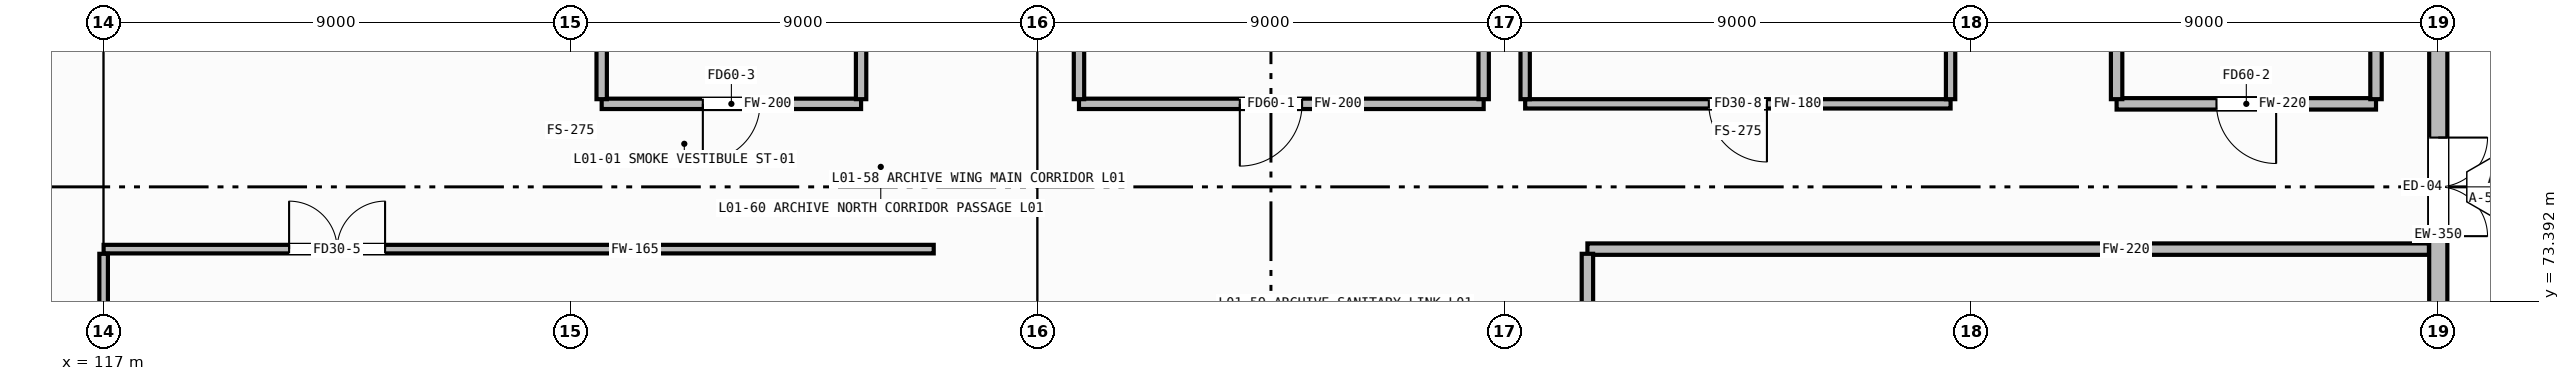
"""IFC4 building model, lengths in metres.
Left out: names, types, materials, properties, quantities, classifications, styles, units other than length and angle.
Written with IfcOpenShell. Run it as: python <this file> out.ifc"""

import sys

from ifc_helpers import new_model, si_unit, direction, frame, frame_2d, origin, place, context, subcontext, project, spatial, rectangle, extrude, element, fill, save


model = new_model("IFC4")
c1 = context("Model", 3, precision=1e-05, world=origin(), true_north=direction((0.0, 1.0)))
c2 = subcontext(c1, "Body", "Model", "MODEL_VIEW")
j1 = project(units=[si_unit("LENGTHUNIT", "METRE"), si_unit("PLANEANGLEUNIT", "RADIAN")], contexts=[c1])
p1 = place(None, origin())
s1 = spatial("IfcSite", under=j1, at=p1, CompositionType="ELEMENT")
p2 = place(p1, origin())
s2 = spatial("IfcBuilding", under=s1, at=p2, CompositionType="ELEMENT")
p3 = place(p2, origin())
s3 = spatial("IfcBuildingStorey", under=s2, at=p3, CompositionType="ELEMENT", Elevation=0.0)
p4 = place(p3, frame((162.0, 78.85, 0.0), z_axis=(0.0, 0.0, 1.0), x_axis=(0.0, -1.0, 0.0)))
e1 = element("IfcWall", 1, at=p4, inside=s3, PredefinedType="STANDARD", context=c2, shape_type="SweptSolid", body=[
    extrude(rectangle(XDim=6.5, YDim=0.35, at=frame_2d((3.25, 0.0))), origin(), (0.0, 0.0, 1.0), 4.055),
])
p5 = place(p4, frame((2.3, 0.0, 0.0)))
e2 = element("IfcOpeningElement", 2, at=p5, cuts=e1, PredefinedType="OPENING", context=c2, shape_type="SweptSolid", body=[
    extrude(rectangle(XDim=1.9, YDim=2.4, at=frame_2d((0.95, 1.2))), frame((0.0, 0.187, 0.0), z_axis=(0.0, -1.0, 0.0), x_axis=(1.0, 0.0, 0.0)), (0.0, 0.0, 1.0), 0.374),
])
p6 = place(p3, frame((126.6, 77.2, 0.0), z_axis=(0.0, 0.0, 1.0), x_axis=(1.0, 0.0, 0.0)))
e3 = element("IfcWall", 3, at=p6, inside=s3, PredefinedType="PARTITIONING", context=c2, shape_type="SweptSolid", body=[
    extrude(rectangle(XDim=5.0, YDim=0.2, at=frame_2d((2.5, 0.0))), origin(), (0.0, 0.0, 1.0), 4.555),
])
p7 = place(p6, frame((1.95, 0.0, 0.0)))
e4 = element("IfcOpeningElement", 4, at=p7, cuts=e3, PredefinedType="OPENING", context=c2, shape_type="SweptSolid", body=[
    extrude(rectangle(XDim=1.1, YDim=2.08, at=frame_2d((0.55, 1.04))), frame((0.0, 0.112, 0.0), z_axis=(0.0, -1.0, 0.0), x_axis=(1.0, 0.0, 0.0)), (0.0, 0.0, 1.0), 0.224),
])
for number, where, z_axis, x_axis in (
    (5, (126.6, 77.29, 0.0), (0.0, 0.0, 1.0), (0.0, 1.0, 0.0)),
    (6, (131.6, 77.29, 0.0), (0.0, 0.0, 1.0), (0.0, 1.0, 0.0)),
):
    element("IfcWall", number, at=place(p3, frame(where, z_axis=z_axis, x_axis=x_axis)), inside=s3, PredefinedType="PARTITIONING", context=c2, shape_type="SweptSolid", body=[
        extrude(rectangle(XDim=3.82, YDim=0.2, at=frame_2d((1.91, 0.0))), origin(), (0.0, 0.0, 1.0), 4.555),
    ])
p8 = place(p3, frame((155.8, 77.2, 0.0), z_axis=(0.0, 0.0, 1.0), x_axis=(1.0, 0.0, 0.0)))
e7 = element("IfcWall", 7, at=p8, inside=s3, PredefinedType="PARTITIONING", context=c2, shape_type="SweptSolid", body=[
    extrude(rectangle(XDim=5.0, YDim=0.22, at=frame_2d((2.5, 0.0))), origin(), (0.0, 0.0, 1.0), 4.555),
])
p9 = place(p8, frame((1.925, 0.0, 0.0)))
e8 = element("IfcOpeningElement", 8, at=p9, cuts=e7, PredefinedType="OPENING", context=c2, shape_type="SweptSolid", body=[
    extrude(rectangle(XDim=1.15, YDim=2.1, at=frame_2d((0.575, 1.05))), frame((0.0, 0.122, 0.0), z_axis=(0.0, -1.0, 0.0), x_axis=(1.0, 0.0, 0.0)), (0.0, 0.0, 1.0), 0.244),
])
for number, where, z_axis, x_axis in (
    (9, (155.8, 77.29, 0.0), (0.0, 0.0, 1.0), (0.0, 1.0, 0.0)),
    (10, (160.8, 77.29, 0.0), (0.0, 0.0, 1.0), (0.0, 1.0, 0.0)),
):
    element("IfcWall", number, at=place(p3, frame(where, z_axis=z_axis, x_axis=x_axis)), inside=s3, PredefinedType="PARTITIONING", context=c2, shape_type="SweptSolid", body=[
        extrude(rectangle(XDim=3.82, YDim=0.22, at=frame_2d((1.91, 0.0))), origin(), (0.0, 0.0, 1.0), 4.555),
    ])
p10 = place(p3, frame((135.8, 77.2, 0.0), z_axis=(0.0, 0.0, 1.0), x_axis=(1.0, 0.0, 0.0)))
e11 = element("IfcWall", 11, at=p10, inside=s3, PredefinedType="PARTITIONING", context=c2, shape_type="SweptSolid", body=[
    extrude(rectangle(XDim=7.8, YDim=0.2, at=frame_2d((3.9, 0.0))), origin(), (0.0, 0.0, 1.0), 4.555),
])
p11 = place(p10, frame((3.1, 0.0, 0.0)))
e12 = element("IfcOpeningElement", 12, at=p11, cuts=e11, PredefinedType="OPENING", context=c2, shape_type="SweptSolid", body=[
    extrude(rectangle(XDim=1.2, YDim=2.1, at=frame_2d((0.6, 1.05))), frame((0.0, 0.112, 0.0), z_axis=(0.0, -1.0, 0.0), x_axis=(1.0, 0.0, 0.0)), (0.0, 0.0, 1.0), 0.224),
])
for number, where, z_axis, x_axis in (
    (13, (135.8, 77.29, 0.0), (0.0, 0.0, 1.0), (0.0, 1.0, 0.0)),
    (14, (143.6, 77.29, 0.0), (0.0, 0.0, 1.0), (0.0, 1.0, 0.0)),
):
    element("IfcWall", number, at=place(p3, frame(where, z_axis=z_axis, x_axis=x_axis)), inside=s3, PredefinedType="PARTITIONING", context=c2, shape_type="SweptSolid", body=[
        extrude(rectangle(XDim=3.82, YDim=0.2, at=frame_2d((1.91, 0.0))), origin(), (0.0, 0.0, 1.0), 4.555),
    ])
p12 = place(p3, frame((144.4, 77.2, 0.0), z_axis=(0.0, 0.0, 1.0), x_axis=(1.0, 0.0, 0.0)))
e15 = element("IfcWall", 15, at=p12, inside=s3, PredefinedType="PARTITIONING", context=c2, shape_type="SweptSolid", body=[
    extrude(rectangle(XDim=8.2, YDim=0.18, at=frame_2d((4.1, 0.0))), origin(), (0.0, 0.0, 1.0), 4.555),
])
p13 = place(p12, frame((3.54, 0.0, 0.0)))
e16 = element("IfcOpeningElement", 16, at=p13, cuts=e15, PredefinedType="OPENING", context=c2, shape_type="SweptSolid", body=[
    extrude(rectangle(XDim=1.12, YDim=2.08, at=frame_2d((0.56, 1.04))), frame((0.0, 0.102, 0.0), z_axis=(0.0, -1.0, 0.0), x_axis=(1.0, 0.0, 0.0)), (0.0, 0.0, 1.0), 0.204),
])
for number, where, z_axis, x_axis in (
    (17, (144.4, 77.29, 0.0), (0.0, 0.0, 1.0), (0.0, 1.0, 0.0)),
    (18, (152.6, 77.29, 0.0), (0.0, 0.0, 1.0), (0.0, 1.0, 0.0)),
):
    element("IfcWall", number, at=place(p3, frame(where, z_axis=z_axis, x_axis=x_axis)), inside=s3, PredefinedType="PARTITIONING", context=c2, shape_type="SweptSolid", body=[
        extrude(rectangle(XDim=3.82, YDim=0.18, at=frame_2d((1.91, 0.0))), origin(), (0.0, 0.0, 1.0), 4.555),
    ])
p14 = place(p3, frame((117.0, 74.4, 0.0), z_axis=(0.0, 0.0, 1.0), x_axis=(1.0, 0.0, 0.0)))
e19 = element("IfcWall", 19, at=p14, inside=s3, PredefinedType="PARTITIONING", context=c2, shape_type="SweptSolid", body=[
    extrude(rectangle(XDim=16.0, YDim=0.165, at=frame_2d((8.0, 0.0))), origin(), (0.0, 0.0, 1.0), 4.555),
])
p15 = place(p14, frame((3.575, 0.0, 0.0)))
e20 = element("IfcOpeningElement", 20, at=p15, cuts=e19, PredefinedType="OPENING", context=c2, shape_type="SweptSolid", body=[
    extrude(rectangle(XDim=1.85, YDim=2.12, at=frame_2d((0.925, 1.06))), frame((0.0, 0.094, 0.0), z_axis=(0.0, -1.0, 0.0), x_axis=(1.0, 0.0, 0.0)), (0.0, 0.0, 1.0), 0.189),
])
p16 = place(p3, frame((117.0, 65.49, 0.0), z_axis=(0.0, 0.0, 1.0), x_axis=(0.0, 1.0, 0.0)))
e21 = element("IfcWall", 21, at=p16, inside=s3, PredefinedType="PARTITIONING", context=c2, shape_type="SweptSolid", body=[
    extrude(rectangle(XDim=8.82, YDim=0.165, at=frame_2d((4.41, 0.0))), origin(), (0.0, 0.0, 1.0), 3.835),
])
p17 = place(p3, frame((145.6, 74.4, 0.0), z_axis=(0.0, 0.0, 1.0), x_axis=(1.0, 0.0, 0.0)))
e22 = element("IfcWall", 22, at=p17, inside=s3, PredefinedType="PARTITIONING", context=c2, shape_type="SweptSolid", body=[
    extrude(rectangle(XDim=16.22, YDim=0.22, at=frame_2d((8.11, 0.0))), origin(), (0.0, 0.0, 1.0), 4.555),
])
p18 = place(p3, frame((145.6, 59.49, 0.0), z_axis=(0.0, 0.0, 1.0), x_axis=(0.0, 1.0, 0.0)))
e23 = element("IfcWall", 23, at=p18, inside=s3, PredefinedType="PARTITIONING", context=c2, shape_type="SweptSolid", body=[
    extrude(rectangle(XDim=14.82, YDim=0.22, at=frame_2d((7.41, 0.0))), origin(), (0.0, 0.0, 1.0), 4.555),
])
p19 = place(p18, frame((8.36, 0.0, 0.0)))
e24 = element("IfcOpeningElement", 24, at=p19, cuts=e23, PredefinedType="OPENING", context=c2, shape_type="SweptSolid", body=[
    extrude(rectangle(XDim=1.1, YDim=2.08, at=frame_2d((0.55, 1.04))), frame((0.0, 0.122, 0.0), z_axis=(0.0, -1.0, 0.0), x_axis=(1.0, 0.0, 0.0)), (0.0, 0.0, 1.0), 0.244),
])
p20 = place(p5, origin())
e25 = element("IfcDoor", 25, at=p20, inside=s3, OperationType="DOUBLE_DOOR_SINGLE_SWING", PredefinedType="DOOR", context=c2, shape_type="SweptSolid", body=[
    extrude(rectangle(XDim=1.9, YDim=2.4, at=frame_2d((0.95, 1.2))), frame((0.0, 0.025, 0.0), z_axis=(0.0, -1.0, 0.0), x_axis=(1.0, 0.0, 0.0)), (0.0, 0.0, 1.0), 0.05),
])
fill(e2, e25)
p21 = place(p7, frame((1.1, 0.0, 0.0), z_axis=(0.0, 0.0, 1.0), x_axis=(-1.0, 0.0, 0.0)))
e26 = element("IfcDoor", 26, at=p21, inside=s3, OperationType="SINGLE_SWING_RIGHT", PredefinedType="DOOR", context=c2, shape_type="SweptSolid", body=[
    extrude(rectangle(XDim=1.1, YDim=2.08, at=frame_2d((0.55, 1.04))), frame((0.0, 0.025, 0.0), z_axis=(0.0, -1.0, 0.0), x_axis=(1.0, 0.0, 0.0)), (0.0, 0.0, 1.0), 0.05),
])
fill(e4, e26)
p22 = place(p9, frame((1.15, 0.0, 0.0), z_axis=(0.0, 0.0, 1.0), x_axis=(-1.0, 0.0, 0.0)))
e27 = element("IfcDoor", 27, at=p22, inside=s3, OperationType="SINGLE_SWING_LEFT", PredefinedType="DOOR", context=c2, shape_type="SweptSolid", body=[
    extrude(rectangle(XDim=1.15, YDim=2.1, at=frame_2d((0.575, 1.05))), frame((0.0, 0.025, 0.0), z_axis=(0.0, -1.0, 0.0), x_axis=(1.0, 0.0, 0.0)), (0.0, 0.0, 1.0), 0.05),
])
fill(e8, e27)
p23 = place(p11, frame((1.2, 0.0, 0.0), z_axis=(0.0, 0.0, 1.0), x_axis=(-1.0, 0.0, 0.0)))
e28 = element("IfcDoor", 28, at=p23, inside=s3, OperationType="SINGLE_SWING_RIGHT", PredefinedType="DOOR", context=c2, shape_type="SweptSolid", body=[
    extrude(rectangle(XDim=1.2, YDim=2.1, at=frame_2d((0.6, 1.05))), frame((0.0, 0.025, 0.0), z_axis=(0.0, -1.0, 0.0), x_axis=(1.0, 0.0, 0.0)), (0.0, 0.0, 1.0), 0.05),
])
fill(e12, e28)
p24 = place(p13, frame((1.12, 0.0, 0.0), z_axis=(0.0, 0.0, 1.0), x_axis=(-1.0, 0.0, 0.0)))
e29 = element("IfcDoor", 29, at=p24, inside=s3, OperationType="SINGLE_SWING_LEFT", PredefinedType="DOOR", context=c2, shape_type="SweptSolid", body=[
    extrude(rectangle(XDim=1.12, YDim=2.08, at=frame_2d((0.56, 1.04))), frame((0.0, 0.025, 0.0), z_axis=(0.0, -1.0, 0.0), x_axis=(1.0, 0.0, 0.0)), (0.0, 0.0, 1.0), 0.05),
])
fill(e16, e29)
p25 = place(p15, origin())
e30 = element("IfcDoor", 30, at=p25, inside=s3, OperationType="DOUBLE_DOOR_SINGLE_SWING", PredefinedType="DOOR", context=c2, shape_type="SweptSolid", body=[
    extrude(rectangle(XDim=1.85, YDim=2.12, at=frame_2d((0.925, 1.06))), frame((0.0, 0.025, 0.0), z_axis=(0.0, -1.0, 0.0), x_axis=(1.0, 0.0, 0.0)), (0.0, 0.0, 1.0), 0.05),
])
fill(e20, e30)
save(model, sys.argv[1])
